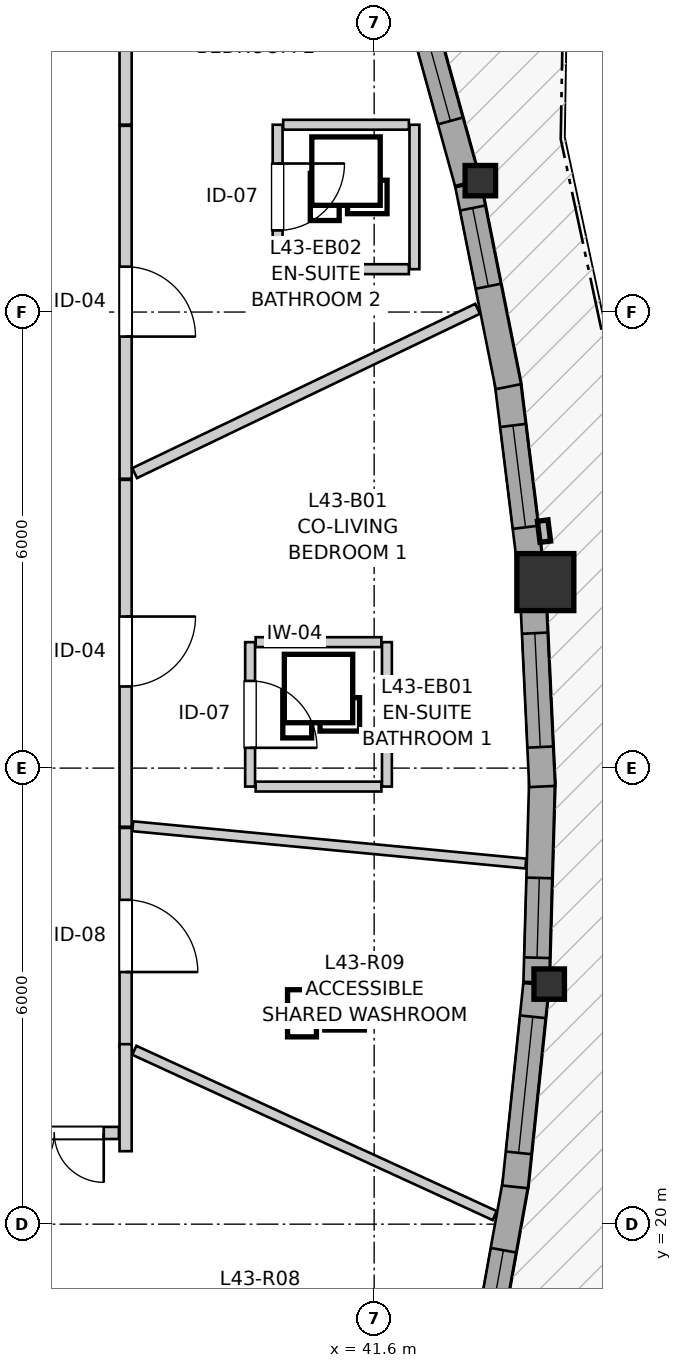
"""IFC4 building model, lengths in metres.
Left out: names, types, materials, properties, quantities, classifications, styles, units other than length and angle.
Written with IfcOpenShell. Run it as: python <this file> out.ifc"""

import sys

from ifc_helpers import new_model, si_unit, direction, frame, frame_2d, origin, origin_2d, place, context, subcontext, project, spatial, rectangle, i_section, extrude, source, transform, mapped, element, fill, save


model = new_model("IFC4")
c1 = context("Model", 3, precision=1e-05, world=origin(), true_north=direction((0.0, 1.0)))
c2 = subcontext(c1, "Body", "Model", "MODEL_VIEW")
j1 = project(units=[si_unit("LENGTHUNIT", "METRE"), si_unit("PLANEANGLEUNIT", "RADIAN")], contexts=[c1])
p1 = place(None, origin())
s1 = spatial("IfcSite", under=j1, at=p1, CompositionType="ELEMENT")
p2 = place(p1, origin())
s2 = spatial("IfcBuilding", under=s1, at=p2, CompositionType="ELEMENT")
p3 = place(p2, frame((0.0, 0.0, 145.8)))
s3 = spatial("IfcBuildingStorey", under=s2, at=p3, CompositionType="ELEMENT", Elevation=145.8)
m1 = source(origin(), c2, "Body", "SweptSolid", [
    extrude(i_section(OverallWidth=0.401, OverallDepth=0.399, WebThickness=0.023, FlangeThickness=0.036, FilletRadius=0.015, at=origin_2d()), origin(), (0.0, 0.0, 1.0), 2.95),
])
p4 = place(p3, frame((43.903, 23.158, 0.0), z_axis=(0.0, 0.0, 1.0), x_axis=(1.0, 0.0, 0.0)))
e1 = element("IfcColumn", 1, at=p4, inside=s3, PredefinedType="PILASTER", context=c2, shape_type="MappedRepresentation", body=[
    mapped(m1, transform((0.0, 0.0, 0.0), x_axis=(1.0, 0.0, 0.0), y_axis=(0.0, 1.0, 0.0), z_axis=(0.0, 0.0, 1.0), scale=1.0)),
])
m2 = source(origin(), c2, "Body", "SweptSolid", [
    extrude(rectangle(XDim=0.75, YDim=0.75, at=origin_2d()), origin(), (0.0, 0.0, 1.0), 2.95),
])
p5 = place(p3, frame((43.852, 28.447, 0.0), z_axis=(0.0, 0.0, 1.0), x_axis=(1.0, 0.0, 0.0)))
e2 = element("IfcColumn", 2, at=p5, inside=s3, PredefinedType="COLUMN", context=c2, shape_type="MappedRepresentation", body=[
    mapped(m2, transform((0.0, 0.0, 0.0), x_axis=(1.0, 0.0, 0.0), y_axis=(0.0, 1.0, 0.0), z_axis=(0.0, 0.0, 1.0), scale=1.0)),
])
p6 = place(p3, frame((42.997, 33.729, 0.0), z_axis=(0.0, 0.0, 1.0), x_axis=(1.0, 0.0, 0.0)))
e3 = element("IfcColumn", 3, at=p6, inside=s3, PredefinedType="PILASTER", context=c2, shape_type="MappedRepresentation", body=[
    mapped(m1, transform((0.0, 0.0, 0.0), x_axis=(1.0, 0.0, 0.0), y_axis=(0.0, 1.0, 0.0), z_axis=(0.0, 0.0, 1.0), scale=1.0)),
])
p7 = place(p3, frame((43.01, 18.044, 0.0), z_axis=(0.0, 0.0, 1.0), x_axis=(0.177116262048, 0.984189935794, 0.0)))
e4 = element("IfcWall", 4, at=p7, inside=s3, PredefinedType="SOLIDWALL", context=c2, shape_type="SweptSolid", body=[
    extrude(rectangle(XDim=2.575, YDim=0.34, at=frame_2d((1.288, 0.0))), origin(), (0.0, 0.0, 1.0), 2.53),
])
p8 = place(p7, frame((0.489, 0.0, 0.82)))
e5 = element("IfcOpeningElement", 5, at=p8, cuts=e4, PredefinedType="OPENING", context=c2, shape_type="SweptSolid", body=[
    extrude(rectangle(XDim=1.15, YDim=1.2, at=frame_2d((0.575, 0.6))), frame((0.0, 0.18, 0.0), z_axis=(0.0, -1.0, 0.0), x_axis=(1.0, 0.0, 0.0)), (0.0, 0.0, 1.0), 0.36),
])
p9 = place(p3, frame((43.454, 20.49, 0.0), z_axis=(0.0, 0.0, 1.0), x_axis=(0.103669919384, 0.994611757328, 0.0)))
e6 = element("IfcWall", 6, at=p9, inside=s3, PredefinedType="SOLIDWALL", context=c2, shape_type="SweptSolid", body=[
    extrude(rectangle(XDim=2.68, YDim=0.34, at=frame_2d((1.34, 0.0))), origin(), (0.0, 0.0, 1.0), 2.53),
])
p10 = place(p9, frame((0.45, 0.0, 0.82)))
e7 = element("IfcOpeningElement", 7, at=p10, cuts=e6, PredefinedType="OPENING", context=c2, shape_type="SweptSolid", body=[
    extrude(rectangle(XDim=1.8, YDim=1.45, at=frame_2d((0.9, 0.725))), frame((0.0, 0.18, 0.0), z_axis=(0.0, -1.0, 0.0), x_axis=(1.0, 0.0, 0.0)), (0.0, 0.0, 1.0), 0.36),
])
p11 = place(p3, frame((43.734, 23.183, 0.0), z_axis=(0.0, 0.0, 1.0), x_axis=(0.028311286797, 0.999599155182, 0.0)))
e8 = element("IfcWall", 8, at=p11, inside=s3, PredefinedType="SOLIDWALL", context=c2, shape_type="SweptSolid", body=[
    extrude(rectangle(XDim=2.665, YDim=0.34, at=frame_2d((1.332, 0.0))), origin(), (0.0, 0.0, 1.0), 2.53),
])
p12 = place(p11, frame((0.323, 0.0, 0.82)))
e9 = element("IfcOpeningElement", 9, at=p12, cuts=e8, PredefinedType="OPENING", context=c2, shape_type="SweptSolid", body=[
    extrude(rectangle(XDim=1.05, YDim=1.45, at=frame_2d((0.525, 0.725))), frame((0.0, 0.18, 0.0), z_axis=(0.0, -1.0, 0.0), x_axis=(1.0, 0.0, 0.0)), (0.0, 0.0, 1.0), 0.36),
])
p13 = place(p3, frame((43.81, 25.758, 0.0), z_axis=(0.0, 0.0, 1.0), x_axis=(-0.047679791281, 0.998862671994, 0.0)))
e10 = element("IfcWall", 10, at=p13, inside=s3, PredefinedType="SOLIDWALL", context=c2, shape_type="SweptSolid", body=[
    extrude(rectangle(XDim=2.53, YDim=0.34, at=frame_2d((1.265, 0.0))), origin(), (0.0, 0.0, 1.0), 2.53),
])
p14 = place(p13, frame((0.52, 0.0, 0.82)))
e11 = element("IfcOpeningElement", 11, at=p14, cuts=e10, PredefinedType="OPENING", context=c2, shape_type="SweptSolid", body=[
    extrude(rectangle(XDim=1.5, YDim=1.45, at=frame_2d((0.75, 0.725))), frame((0.0, 0.18, 0.0), z_axis=(0.0, -1.0, 0.0), x_axis=(1.0, 0.0, 0.0)), (0.0, 0.0, 1.0), 0.36),
])
p15 = place(p3, frame((43.664, 28.58, 0.0), z_axis=(0.0, 0.0, 1.0), x_axis=(-0.122794881762, 0.992432071737, 0.0)))
e12 = element("IfcWall", 12, at=p15, inside=s3, PredefinedType="SOLIDWALL", context=c2, shape_type="SweptSolid", body=[
    extrude(rectangle(XDim=2.545, YDim=0.34, at=frame_2d((1.272, 0.0))), origin(), (0.0, 0.0, 1.0), 2.53),
])
p16 = place(p15, frame((0.592, 0.0, 0.82)))
e13 = element("IfcOpeningElement", 13, at=p16, cuts=e12, PredefinedType="OPENING", context=c2, shape_type="SweptSolid", body=[
    extrude(rectangle(XDim=1.35, YDim=1.45, at=frame_2d((0.675, 0.725))), frame((0.0, 0.18, 0.0), z_axis=(0.0, -1.0, 0.0), x_axis=(1.0, 0.0, 0.0)), (0.0, 0.0, 1.0), 0.36),
])
p17 = place(p3, frame((43.366, 31.018, 0.0), z_axis=(0.0, 0.0, 1.0), x_axis=(-0.196116135138, 0.980580675691, 0.0)))
e14 = element("IfcWall", 14, at=p17, inside=s3, PredefinedType="SOLIDWALL", context=c2, shape_type="SweptSolid", body=[
    extrude(rectangle(XDim=2.71, YDim=0.34, at=frame_2d((1.355, 0.0))), origin(), (0.0, 0.0, 1.0), 2.53),
])
p18 = place(p17, frame((1.347, 0.0, 0.82)))
e15 = element("IfcOpeningElement", 15, at=p18, cuts=e14, PredefinedType="OPENING", context=c2, shape_type="SweptSolid", body=[
    extrude(rectangle(XDim=1.05, YDim=1.45, at=frame_2d((0.525, 0.725))), frame((0.0, 0.18, 0.0), z_axis=(0.0, -1.0, 0.0), x_axis=(1.0, 0.0, 0.0)), (0.0, 0.0, 1.0), 0.36),
])
p19 = place(p3, frame((42.828, 33.703, 0.0), z_axis=(0.0, 0.0, 1.0), x_axis=(-0.266340796898, 0.963878923884, 0.0)))
e16 = element("IfcWall", 16, at=p19, inside=s3, PredefinedType="SOLIDWALL", context=c2, shape_type="SweptSolid", body=[
    extrude(rectangle(XDim=2.755, YDim=0.34, at=frame_2d((1.377, 0.0))), origin(), (0.0, 0.0, 1.0), 2.53),
])
p20 = place(p19, frame((0.842, 0.0, 0.82)))
e17 = element("IfcOpeningElement", 17, at=p20, cuts=e16, PredefinedType="OPENING", context=c2, shape_type="SweptSolid", body=[
    extrude(rectangle(XDim=1.05, YDim=1.45, at=frame_2d((0.525, 0.725))), frame((0.0, 0.18, 0.0), z_axis=(0.0, -1.0, 0.0), x_axis=(1.0, 0.0, 0.0)), (0.0, 0.0, 1.0), 0.36),
])
p21 = place(p3, frame((38.33, 34.45, 0.0), z_axis=(0.0, 0.0, 1.0), x_axis=(0.0, -1.0, 0.0)))
e18 = element("IfcWall", 18, at=p21, inside=s3, PredefinedType="PARTITIONING", context=c2, shape_type="SweptSolid", body=[
    extrude(rectangle(XDim=4.643, YDim=0.16, at=frame_2d((2.322, 0.0))), origin(), (0.0, 0.0, 1.0), 2.588),
])
p22 = place(p21, frame((1.853, 0.0, 0.0)))
e19 = element("IfcOpeningElement", 19, at=p22, cuts=e18, PredefinedType="OPENING", context=c2, shape_type="SweptSolid", body=[
    extrude(rectangle(XDim=0.92, YDim=2.1, at=frame_2d((0.46, 1.05))), frame((0.0, 0.09, 0.0), z_axis=(0.0, -1.0, 0.0), x_axis=(1.0, 0.0, 0.0)), (0.0, 0.0, 1.0), 0.18),
])
p23 = place(p3, frame((38.33, 29.792, 0.0), z_axis=(0.0, 0.0, 1.0), x_axis=(0.0, -1.0, 0.0)))
e20 = element("IfcWall", 20, at=p23, inside=s3, PredefinedType="PARTITIONING", context=c2, shape_type="SweptSolid", body=[
    extrude(rectangle(XDim=4.564, YDim=0.16, at=frame_2d((2.282, 0.0))), origin(), (0.0, 0.0, 1.0), 2.95),
])
p24 = place(p23, frame((1.798, 0.0, 0.0)))
e21 = element("IfcOpeningElement", 21, at=p24, cuts=e20, PredefinedType="OPENING", context=c2, shape_type="SweptSolid", body=[
    extrude(rectangle(XDim=0.92, YDim=2.1, at=frame_2d((0.46, 1.05))), frame((0.0, 0.09, 0.0), z_axis=(0.0, -1.0, 0.0), x_axis=(1.0, 0.0, 0.0)), (0.0, 0.0, 1.0), 0.18),
])
p25 = place(p3, frame((38.33, 25.213, 0.0), z_axis=(0.0, 0.0, 1.0), x_axis=(0.0, -1.0, 0.0)))
e22 = element("IfcWall", 22, at=p25, inside=s3, PredefinedType="PARTITIONING", context=c2, shape_type="SweptSolid", body=[
    extrude(rectangle(XDim=2.89, YDim=0.16, at=frame_2d((1.445, 0.0))), origin(), (0.0, 0.0, 1.0), 2.95),
])
p26 = place(p25, frame((0.946, 0.0, 0.0)))
e23 = element("IfcOpeningElement", 23, at=p26, cuts=e22, PredefinedType="OPENING", context=c2, shape_type="SweptSolid", body=[
    extrude(rectangle(XDim=0.95, YDim=2.1, at=frame_2d((0.475, 1.05))), frame((0.0, 0.09, 0.0), z_axis=(0.0, -1.0, 0.0), x_axis=(1.0, 0.0, 0.0)), (0.0, 0.0, 1.0), 0.18),
])
p27 = place(p3, frame((39.968, 27.657, 0.0), z_axis=(0.0, 0.0, 1.0), x_axis=(0.0, -1.0, 0.0)))
e24 = element("IfcWall", 24, at=p27, inside=s3, PredefinedType="PARTITIONING", context=c2, shape_type="SweptSolid", body=[
    extrude(rectangle(XDim=1.9, YDim=0.13, at=frame_2d((0.95, 0.0))), origin(), (0.0, 0.0, 1.0), 2.95),
])
p28 = place(p27, frame((0.51, 0.0, 0.0)))
e25 = element("IfcOpeningElement", 25, at=p28, cuts=e24, PredefinedType="OPENING", context=c2, shape_type="SweptSolid", body=[
    extrude(rectangle(XDim=0.88, YDim=2.05, at=frame_2d((0.44, 1.025))), frame((0.0, 0.075, 0.0), z_axis=(0.0, -1.0, 0.0), x_axis=(1.0, 0.0, 0.0)), (0.0, 0.0, 1.0), 0.15),
])
p29 = place(p3, frame((40.33, 34.464, 0.0), z_axis=(0.0, 0.0, 1.0), x_axis=(0.0, -1.0, 0.0)))
e26 = element("IfcWall", 26, at=p29, inside=s3, PredefinedType="PARTITIONING", context=c2, shape_type="SweptSolid", body=[
    extrude(rectangle(XDim=1.9, YDim=0.13, at=frame_2d((0.95, 0.0))), origin(), (0.0, 0.0, 1.0), 2.558),
])
p30 = place(p29, frame((0.51, 0.0, 0.0)))
e27 = element("IfcOpeningElement", 27, at=p30, cuts=e26, PredefinedType="OPENING", context=c2, shape_type="SweptSolid", body=[
    extrude(rectangle(XDim=0.88, YDim=2.05, at=frame_2d((0.44, 1.025))), frame((0.0, 0.075, 0.0), z_axis=(0.0, -1.0, 0.0), x_axis=(1.0, 0.0, 0.0)), (0.0, 0.0, 1.0), 0.15),
])
p31 = place(p3, frame((38.242, 21.2, 0.0), z_axis=(0.0, 0.0, 1.0), x_axis=(-1.0, 0.0, 0.0)))
e28 = element("IfcWall", 28, at=p31, inside=s3, PredefinedType="PARTITIONING", context=c2, shape_type="SweptSolid", body=[
    extrude(rectangle(XDim=1.684, YDim=0.16, at=frame_2d((0.842, 0.0))), origin(), (0.0, 0.0, 1.0), 2.95),
])
p32 = place(p31, frame((0.2, 0.0, 0.0)))
e29 = element("IfcOpeningElement", 29, at=p32, cuts=e28, PredefinedType="OPENING", context=c2, shape_type="SweptSolid", body=[
    extrude(rectangle(XDim=1.3, YDim=2.1, at=frame_2d((0.65, 1.05))), frame((0.0, 0.09, 0.0), z_axis=(0.0, -1.0, 0.0), x_axis=(1.0, 0.0, 0.0)), (0.0, 0.0, 1.0), 0.18),
])
p33 = place(p3, frame((36.609, 19.221, 0.0), z_axis=(0.0, 0.0, 1.0), x_axis=(0.67832941292, -0.734757924467, 0.0)))
e30 = element("IfcWall", 30, at=p33, inside=s3, PredefinedType="PARTITIONING", context=c2, shape_type="SweptSolid", body=[
    extrude(rectangle(XDim=7.403, YDim=0.145, at=frame_2d((3.701, 0.0))), origin(), (0.0, 0.0, 1.0), 2.95),
])
p34 = place(p3, frame((38.444, 22.288, 0.0), z_axis=(0.0, 0.0, 1.0), x_axis=(0.908945866603, -0.416914153736, 0.0)))
e31 = element("IfcWall", 31, at=p34, inside=s3, PredefinedType="PARTITIONING", context=c2, shape_type="SweptSolid", body=[
    extrude(rectangle(XDim=5.217, YDim=0.13, at=frame_2d((2.608, 0.0))), origin(), (0.0, 0.0, 1.0), 2.95),
])
p35 = place(p3, frame((38.424, 25.235, 0.0), z_axis=(0.0, 0.0, 1.0), x_axis=(0.995523942217, -0.094509684549, 0.0)))
e32 = element("IfcWall", 32, at=p35, inside=s3, PredefinedType="PARTITIONING", context=c2, shape_type="SweptSolid", body=[
    extrude(rectangle(XDim=5.195, YDim=0.13, at=frame_2d((2.597, 0.0))), origin(), (0.0, 0.0, 1.0), 2.95),
])
p36 = place(p3, frame((38.448, 29.881, 0.0), z_axis=(0.0, 0.0, 1.0), x_axis=(0.901842564972, 0.432064796072, 0.0)))
e33 = element("IfcWall", 33, at=p36, inside=s3, PredefinedType="PARTITIONING", context=c2, shape_type="SweptSolid", body=[
    extrude(rectangle(XDim=5.004, YDim=0.145, at=frame_2d((2.502, 0.0))), origin(), (0.0, 0.0, 1.0), 2.95),
])
p37 = place(p3, frame((41.768, 25.757, 0.0), z_axis=(0.0, 0.0, 1.0), x_axis=(0.0, 1.0, 0.0)))
e34 = element("IfcWall", 34, at=p37, inside=s3, PredefinedType="PARTITIONING", context=c2, shape_type="SweptSolid", body=[
    extrude(rectangle(XDim=1.9, YDim=0.13, at=frame_2d((0.95, 0.0))), origin(), (0.0, 0.0, 1.0), 2.95),
])
p38 = place(p3, frame((42.13, 32.564, 0.0), z_axis=(0.0, 0.0, 1.0), x_axis=(0.0, 1.0, 0.0)))
e35 = element("IfcWall", 35, at=p38, inside=s3, PredefinedType="PARTITIONING", context=c2, shape_type="SweptSolid", body=[
    extrude(rectangle(XDim=1.9, YDim=0.13, at=frame_2d((0.95, 0.0))), origin(), (0.0, 0.0, 1.0), 2.95),
])
for number, where, z_axis, x_axis in (
    (36, (40.403, 34.464, 0.0), (0.0, 0.0, 1.0), (1.0, 0.0, 0.0)),
    (37, (40.403, 32.564, 0.0), (0.0, 0.0, 1.0), (1.0, 0.0, 0.0)),
):
    element("IfcWall", number, at=place(p3, frame(where, z_axis=z_axis, x_axis=x_axis)), inside=s3, PredefinedType="PARTITIONING", context=c2, shape_type="SweptSolid", body=[
        extrude(rectangle(XDim=1.654, YDim=0.13, at=frame_2d((0.827, 0.0))), origin(), (0.0, 0.0, 1.0), 2.95),
    ])
p39 = place(p3, frame((40.041, 27.657, 0.0), z_axis=(0.0, 0.0, 1.0), x_axis=(1.0, 0.0, 0.0)))
e38 = element("IfcWall", 38, at=p39, inside=s3, PredefinedType="PARTITIONING", context=c2, shape_type="SweptSolid", body=[
    extrude(rectangle(XDim=1.654, YDim=0.13, at=frame_2d((0.827, 0.0))), origin(), (0.0, 0.0, 1.0), 2.318),
])
p40 = place(p3, frame((40.041, 25.757, 0.0), z_axis=(0.0, 0.0, 1.0), x_axis=(1.0, 0.0, 0.0)))
e39 = element("IfcWall", 39, at=p40, inside=s3, PredefinedType="PARTITIONING", context=c2, shape_type="SweptSolid", body=[
    extrude(rectangle(XDim=1.654, YDim=0.13, at=frame_2d((0.827, 0.0))), origin(), (0.0, 0.0, 1.0), 2.95),
])
p41 = place(p3, frame((38.33, 34.465, 0.0), z_axis=(0.0, 0.0, 1.0), x_axis=(0.0, 1.0, 0.0)))
e40 = element("IfcWall", 40, at=p41, inside=s3, PredefinedType="PARTITIONING", context=c2, shape_type="SweptSolid", body=[
    extrude(rectangle(XDim=1.765, YDim=0.16, at=frame_2d((0.882, 0.0))), origin(), (0.0, 0.0, 1.0), 2.588),
])
p42 = place(p3, frame((38.33, 20.96, 0.0), z_axis=(0.0, 0.0, 1.0), x_axis=(0.0, 1.0, 0.0)))
e41 = element("IfcWall", 41, at=p42, inside=s3, PredefinedType="PARTITIONING", context=c2, shape_type="SweptSolid", body=[
    extrude(rectangle(XDim=1.408, YDim=0.16, at=frame_2d((0.704, 0.0))), origin(), (0.0, 0.0, 1.0), 2.95),
])
m3 = source(origin(), c2, "Body", "SweptSolid", [
    extrude(rectangle(XDim=1.15, YDim=1.2, at=frame_2d((0.575, 0.6))), frame((0.0, 0.03, 0.0), z_axis=(0.0, -1.0, 0.0), x_axis=(1.0, 0.0, 0.0)), (0.0, 0.0, 1.0), 0.06),
])
p43 = place(p8, origin())
e42 = element("IfcWindow", 42, at=p43, inside=s3, PartitioningType="SINGLE_PANEL", PredefinedType="WINDOW", context=c2, shape_type="MappedRepresentation", body=[
    mapped(m3, transform((0.0, 0.0, 0.0), x_axis=(1.0, 0.0, 0.0), y_axis=(0.0, 1.0, 0.0), z_axis=(0.0, 0.0, 1.0), scale=1.0)),
])
fill(e5, e42)
m4 = source(origin(), c2, "Body", "SweptSolid", [
    extrude(rectangle(XDim=1.8, YDim=1.45, at=frame_2d((0.9, 0.725))), frame((0.0, 0.03, 0.0), z_axis=(0.0, -1.0, 0.0), x_axis=(1.0, 0.0, 0.0)), (0.0, 0.0, 1.0), 0.06),
])
p44 = place(p10, origin())
e43 = element("IfcWindow", 43, at=p44, inside=s3, PartitioningType="SINGLE_PANEL", PredefinedType="WINDOW", context=c2, shape_type="MappedRepresentation", body=[
    mapped(m4, transform((0.0, 0.0, 0.0), x_axis=(1.0, 0.0, 0.0), y_axis=(0.0, 1.0, 0.0), z_axis=(0.0, 0.0, 1.0), scale=1.0)),
])
fill(e7, e43)
m5 = source(origin(), c2, "Body", "SweptSolid", [
    extrude(rectangle(XDim=1.05, YDim=1.45, at=frame_2d((0.525, 0.725))), frame((0.0, 0.03, 0.0), z_axis=(0.0, -1.0, 0.0), x_axis=(1.0, 0.0, 0.0)), (0.0, 0.0, 1.0), 0.06),
])
p45 = place(p12, origin())
e44 = element("IfcWindow", 44, at=p45, inside=s3, PartitioningType="SINGLE_PANEL", PredefinedType="WINDOW", context=c2, shape_type="MappedRepresentation", body=[
    mapped(m5, transform((0.0, 0.0, 0.0), x_axis=(1.0, 0.0, 0.0), y_axis=(0.0, 1.0, 0.0), z_axis=(0.0, 0.0, 1.0), scale=1.0)),
])
fill(e9, e44)
m6 = source(origin(), c2, "Body", "SweptSolid", [
    extrude(rectangle(XDim=1.5, YDim=1.45, at=frame_2d((0.75, 0.725))), frame((0.0, 0.03, 0.0), z_axis=(0.0, -1.0, 0.0), x_axis=(1.0, 0.0, 0.0)), (0.0, 0.0, 1.0), 0.06),
])
p46 = place(p14, origin())
e45 = element("IfcWindow", 45, at=p46, inside=s3, PartitioningType="SINGLE_PANEL", PredefinedType="WINDOW", context=c2, shape_type="MappedRepresentation", body=[
    mapped(m6, transform((0.0, 0.0, 0.0), x_axis=(1.0, 0.0, 0.0), y_axis=(0.0, 1.0, 0.0), z_axis=(0.0, 0.0, 1.0), scale=1.0)),
])
fill(e11, e45)
m7 = source(origin(), c2, "Body", "SweptSolid", [
    extrude(rectangle(XDim=1.35, YDim=1.45, at=frame_2d((0.675, 0.725))), frame((0.0, 0.03, 0.0), z_axis=(0.0, -1.0, 0.0), x_axis=(1.0, 0.0, 0.0)), (0.0, 0.0, 1.0), 0.06),
])
p47 = place(p16, origin())
e46 = element("IfcWindow", 46, at=p47, inside=s3, PartitioningType="SINGLE_PANEL", PredefinedType="WINDOW", context=c2, shape_type="MappedRepresentation", body=[
    mapped(m7, transform((0.0, 0.0, 0.0), x_axis=(1.0, 0.0, 0.0), y_axis=(0.0, 1.0, 0.0), z_axis=(0.0, 0.0, 1.0), scale=1.0)),
])
fill(e13, e46)
p48 = place(p18, origin())
e47 = element("IfcWindow", 47, at=p48, inside=s3, PartitioningType="SINGLE_PANEL", PredefinedType="WINDOW", context=c2, shape_type="MappedRepresentation", body=[
    mapped(m5, transform((0.0, 0.0, 0.0), x_axis=(1.0, 0.0, 0.0), y_axis=(0.0, 1.0, 0.0), z_axis=(0.0, 0.0, 1.0), scale=1.0)),
])
fill(e15, e47)
p49 = place(p20, origin())
e48 = element("IfcWindow", 48, at=p49, inside=s3, PartitioningType="SINGLE_PANEL", PredefinedType="WINDOW", context=c2, shape_type="MappedRepresentation", body=[
    mapped(m5, transform((0.0, 0.0, 0.0), x_axis=(1.0, 0.0, 0.0), y_axis=(0.0, 1.0, 0.0), z_axis=(0.0, 0.0, 1.0), scale=1.0)),
])
fill(e17, e48)
m8 = source(origin(), c2, "Body", "SweptSolid", [
    extrude(rectangle(XDim=0.92, YDim=2.1, at=frame_2d((0.46, 1.05))), frame((0.0, 0.025, 0.0), z_axis=(0.0, -1.0, 0.0), x_axis=(1.0, 0.0, 0.0)), (0.0, 0.0, 1.0), 0.05),
])
p50 = place(p22, origin())
e49 = element("IfcDoor", 49, at=p50, inside=s3, OperationType="SINGLE_SWING_RIGHT", PredefinedType="DOOR", context=c2, shape_type="MappedRepresentation", body=[
    mapped(m8, transform((0.0, 0.0, 0.0), x_axis=(1.0, 0.0, 0.0), y_axis=(0.0, 1.0, 0.0), z_axis=(0.0, 0.0, 1.0), scale=1.0)),
])
fill(e19, e49)
p51 = place(p24, origin())
e50 = element("IfcDoor", 50, at=p51, inside=s3, OperationType="SINGLE_SWING_LEFT", PredefinedType="DOOR", context=c2, shape_type="MappedRepresentation", body=[
    mapped(m8, transform((0.0, 0.0, 0.0), x_axis=(1.0, 0.0, 0.0), y_axis=(0.0, 1.0, 0.0), z_axis=(0.0, 0.0, 1.0), scale=1.0)),
])
fill(e21, e50)
m9 = source(origin(), c2, "Body", "SweptSolid", [
    extrude(rectangle(XDim=0.95, YDim=2.1, at=frame_2d((0.475, 1.05))), frame((0.0, 0.025, 0.0), z_axis=(0.0, -1.0, 0.0), x_axis=(1.0, 0.0, 0.0)), (0.0, 0.0, 1.0), 0.05),
])
p52 = place(p26, origin())
e51 = element("IfcDoor", 51, at=p52, inside=s3, OperationType="SINGLE_SWING_RIGHT", PredefinedType="DOOR", context=c2, shape_type="MappedRepresentation", body=[
    mapped(m9, transform((0.0, 0.0, 0.0), x_axis=(1.0, 0.0, 0.0), y_axis=(0.0, 1.0, 0.0), z_axis=(0.0, 0.0, 1.0), scale=1.0)),
])
fill(e23, e51)
m10 = source(origin(), c2, "Body", "SweptSolid", [
    extrude(rectangle(XDim=0.88, YDim=2.05, at=frame_2d((0.44, 1.025))), frame((0.0, 0.025, 0.0), z_axis=(0.0, -1.0, 0.0), x_axis=(1.0, 0.0, 0.0)), (0.0, 0.0, 1.0), 0.05),
])
p53 = place(p28, origin())
e52 = element("IfcDoor", 52, at=p53, inside=s3, OperationType="SINGLE_SWING_RIGHT", PredefinedType="DOOR", context=c2, shape_type="MappedRepresentation", body=[
    mapped(m10, transform((0.0, 0.0, 0.0), x_axis=(1.0, 0.0, 0.0), y_axis=(0.0, 1.0, 0.0), z_axis=(0.0, 0.0, 1.0), scale=1.0)),
])
fill(e25, e52)
p54 = place(p30, origin())
e53 = element("IfcDoor", 53, at=p54, inside=s3, OperationType="SINGLE_SWING_LEFT", PredefinedType="DOOR", context=c2, shape_type="MappedRepresentation", body=[
    mapped(m10, transform((0.0, 0.0, 0.0), x_axis=(1.0, 0.0, 0.0), y_axis=(0.0, 1.0, 0.0), z_axis=(0.0, 0.0, 1.0), scale=1.0)),
])
fill(e27, e53)
m11 = source(origin(), c2, "Body", "SweptSolid", [
    extrude(rectangle(XDim=1.3, YDim=2.1, at=frame_2d((0.65, 1.05))), frame((0.0, 0.025, 0.0), z_axis=(0.0, -1.0, 0.0), x_axis=(1.0, 0.0, 0.0)), (0.0, 0.0, 1.0), 0.05),
])
p55 = place(p32, origin())
e54 = element("IfcDoor", 54, at=p55, inside=s3, OperationType="DOUBLE_DOOR_SINGLE_SWING", PredefinedType="DOOR", context=c2, shape_type="MappedRepresentation", body=[
    mapped(m11, transform((0.0, 0.0, 0.0), x_axis=(1.0, 0.0, 0.0), y_axis=(0.0, 1.0, 0.0), z_axis=(0.0, 0.0, 1.0), scale=1.0)),
])
fill(e29, e54)
save(model, sys.argv[1])
